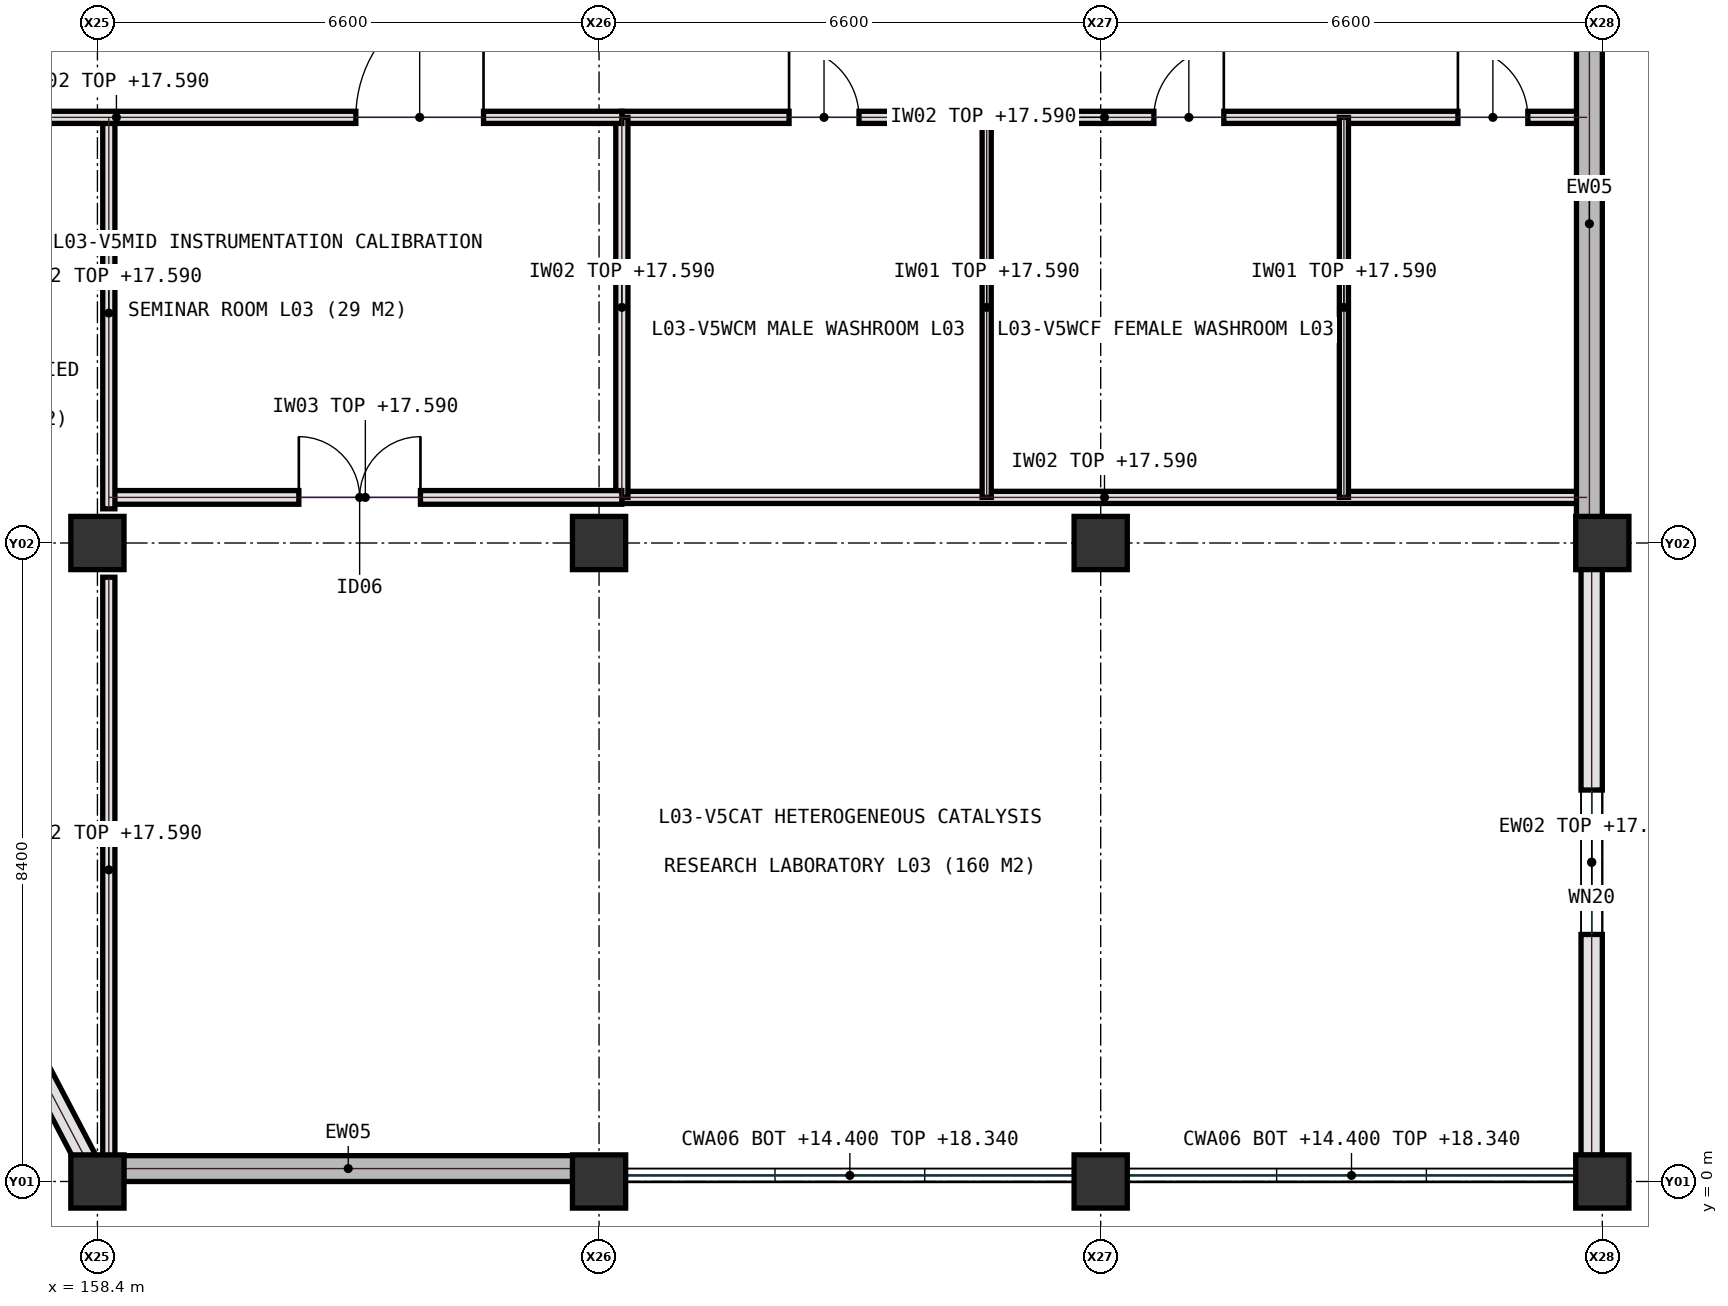
"""IFC4 building model, lengths in metres.
Left out: names, types, materials, properties, quantities, classifications, styles, units other than length and angle.
Written with IfcOpenShell. Run it as: python <this file> out.ifc"""

import sys

from ifc_helpers import new_model, si_unit, direction, frame, frame_2d, origin, origin_2d, place, context, subcontext, project, spatial, rectangle, extrude, element, fill, save


model = new_model("IFC4")
c1 = context("Model", 3, precision=1e-05, world=origin(), true_north=direction((0.0, 1.0)))
c2 = subcontext(c1, "Body", "Model", "MODEL_VIEW")
j1 = project(units=[si_unit("LENGTHUNIT", "METRE"), si_unit("PLANEANGLEUNIT", "RADIAN")], contexts=[c1])
p1 = place(None, origin())
s1 = spatial("IfcSite", under=j1, at=p1, CompositionType="ELEMENT")
p2 = place(p1, origin())
s2 = spatial("IfcBuilding", under=s1, at=p2, CompositionType="ELEMENT")
p3 = place(p2, frame((0.0, 0.0, 14.4)))
s3 = spatial("IfcBuildingStorey", under=s2, at=p3, CompositionType="ELEMENT", Elevation=14.4)
for number, where, z_axis, x_axis in (
    (1, (158.4, 0.0, 0.0), (0.0, 0.0, 1.0), (1.0, 0.0, 0.0)),
    (2, (158.4, 8.4, 0.0), (0.0, 0.0, 1.0), (1.0, 0.0, 0.0)),
    (3, (165.0, 0.0, 0.0), (0.0, 0.0, 1.0), (1.0, 0.0, 0.0)),
    (4, (165.0, 8.4, 0.0), (0.0, 0.0, 1.0), (1.0, 0.0, 0.0)),
    (5, (171.6, 0.0, 0.0), (0.0, 0.0, 1.0), (1.0, 0.0, 0.0)),
    (6, (171.6, 8.4, 0.0), (0.0, 0.0, 1.0), (1.0, 0.0, 0.0)),
    (7, (178.2, 0.0, 0.0), (0.0, 0.0, 1.0), (1.0, 0.0, 0.0)),
    (8, (178.2, 8.4, 0.0), (0.0, 0.0, 1.0), (1.0, 0.0, 0.0)),
):
    element("IfcColumn", number, at=place(p3, frame(where, z_axis=z_axis, x_axis=x_axis)), inside=s3, PredefinedType="COLUMN", context=c2, shape_type="SweptSolid", body=[
        extrude(rectangle(XDim=0.7, YDim=0.7, at=origin_2d()), origin(), (0.0, 0.0, 1.0), 4.2),
    ])
p4 = place(p3, frame((165.3, 14.0, 0.0), z_axis=(0.0, 0.0, 1.0), x_axis=(1.0, 0.0, 0.0)))
e9 = element("IfcWall", 9, at=p4, inside=s3, PredefinedType="PARTITIONING", context=c2, shape_type="SweptSolid", body=[
    extrude(rectangle(XDim=12.7, YDim=0.16, at=frame_2d((6.35, 0.0))), origin(), (0.0, 0.0, 1.0), 3.19),
])
p5 = place(p4, frame((2.2, 0.0, 0.0)))
e10 = element("IfcOpeningElement", 10, at=p5, cuts=e9, PredefinedType="OPENING", context=c2, shape_type="SweptSolid", body=[
    extrude(rectangle(XDim=0.92, YDim=2.08, at=frame_2d((0.46, 1.04))), frame((0.0, 0.09, 0.0), z_axis=(0.0, -1.0, 0.0), x_axis=(1.0, 0.0, 0.0)), (0.0, 0.0, 1.0), 0.18),
])
p6 = place(p4, frame((7.0, 0.0, 0.0)))
e11 = element("IfcOpeningElement", 11, at=p6, cuts=e9, PredefinedType="OPENING", context=c2, shape_type="SweptSolid", body=[
    extrude(rectangle(XDim=0.92, YDim=2.08, at=frame_2d((0.46, 1.04))), frame((0.0, 0.09, 0.0), z_axis=(0.0, -1.0, 0.0), x_axis=(1.0, 0.0, 0.0)), (0.0, 0.0, 1.0), 0.18),
])
p7 = place(p4, frame((11.0, 0.0, 0.0)))
e12 = element("IfcOpeningElement", 12, at=p7, cuts=e9, PredefinedType="OPENING", context=c2, shape_type="SweptSolid", body=[
    extrude(rectangle(XDim=0.92, YDim=2.08, at=frame_2d((0.46, 1.04))), frame((0.0, 0.09, 0.0), z_axis=(0.0, -1.0, 0.0), x_axis=(1.0, 0.0, 0.0)), (0.0, 0.0, 1.0), 0.18),
])
p8 = place(p3, frame((165.3, 9.0, 0.0), z_axis=(0.0, 0.0, 1.0), x_axis=(1.0, 0.0, 0.0)))
e13 = element("IfcWall", 13, at=p8, inside=s3, PredefinedType="PARTITIONING", context=c2, shape_type="SweptSolid", body=[
    extrude(rectangle(XDim=12.7, YDim=0.16, at=frame_2d((6.35, 0.0))), origin(), (0.0, 0.0, 1.0), 3.19),
])
p9 = place(p3, frame((165.3, 9.0, 0.0), z_axis=(0.0, 0.0, 1.0), x_axis=(0.0, 1.0, 0.0)))
e14 = element("IfcWall", 14, at=p9, inside=s3, PredefinedType="PARTITIONING", context=c2, shape_type="SweptSolid", body=[
    extrude(rectangle(XDim=5.0, YDim=0.16, at=frame_2d((2.5, 0.0))), origin(), (0.0, 0.0, 1.0), 3.19),
])
for number, where, z_axis, x_axis in (
    (15, (170.1, 9.0, 0.0), (0.0, 0.0, 1.0), (0.0, 1.0, 0.0)),
    (16, (174.8, 9.0, 0.0), (0.0, 0.0, 1.0), (0.0, 1.0, 0.0)),
):
    element("IfcWall", number, at=place(p3, frame(where, z_axis=z_axis, x_axis=x_axis)), inside=s3, PredefinedType="PARTITIONING", context=c2, shape_type="SweptSolid", body=[
        extrude(rectangle(XDim=5.0, YDim=0.12, at=frame_2d((2.5, 0.0))), origin(), (0.0, 0.0, 1.0), 3.19),
    ])
p10 = place(p3, frame((158.55, 9.0, 0.0), z_axis=(0.0, 0.0, 1.0), x_axis=(1.0, 0.0, 0.0)))
e17 = element("IfcWall", 17, at=p10, inside=s3, PredefinedType="SOLIDWALL", context=c2, shape_type="SweptSolid", body=[
    extrude(rectangle(XDim=6.75, YDim=0.18, at=frame_2d((3.375, 0.0))), origin(), (0.0, 0.0, 1.0), 3.19),
])
p11 = place(p10, frame((2.5, 0.0, 0.0)))
e18 = element("IfcOpeningElement", 18, at=p11, cuts=e17, PredefinedType="OPENING", context=c2, shape_type="SweptSolid", body=[
    extrude(rectangle(XDim=1.6, YDim=2.2, at=frame_2d((0.8, 1.1))), frame((0.0, 0.1, 0.0), z_axis=(0.0, -1.0, 0.0), x_axis=(1.0, 0.0, 0.0)), (0.0, 0.0, 1.0), 0.2),
])
p12 = place(p3, frame((158.55, 0.25, 0.0), z_axis=(0.0, 0.0, 1.0), x_axis=(0.0, 1.0, 0.0)))
e19 = element("IfcWall", 19, at=p12, inside=s3, PredefinedType="PARTITIONING", context=c2, shape_type="SweptSolid", body=[
    extrude(rectangle(XDim=7.7, YDim=0.16, at=frame_2d((3.85, 0.0))), origin(), (0.0, 0.0, 1.0), 3.19),
])
p13 = place(p3, frame((158.55, 8.85, 0.0), z_axis=(0.0, 0.0, 1.0), x_axis=(0.0, 1.0, 0.0)))
e20 = element("IfcWall", 20, at=p13, inside=s3, PredefinedType="PARTITIONING", context=c2, shape_type="SweptSolid", body=[
    extrude(rectangle(XDim=5.15, YDim=0.16, at=frame_2d((2.575, 0.0))), origin(), (0.0, 0.0, 1.0), 3.19),
])
p14 = place(p3, frame((152.0, 14.0, 0.0), z_axis=(0.0, 0.0, 1.0), x_axis=(1.0, 0.0, 0.0)))
e21 = element("IfcWall", 21, at=p14, inside=s3, PredefinedType="PARTITIONING", context=c2, shape_type="SweptSolid", body=[
    extrude(rectangle(XDim=13.3, YDim=0.16, at=frame_2d((6.65, 0.0))), origin(), (0.0, 0.0, 1.0), 3.19),
])
p15 = place(p14, frame((2.6, 0.0, 0.0)))
e22 = element("IfcOpeningElement", 22, at=p15, cuts=e21, PredefinedType="OPENING", context=c2, shape_type="SweptSolid", body=[
    extrude(rectangle(XDim=1.68, YDim=2.28, at=frame_2d((0.84, 1.14))), frame((0.0, 0.09, 0.0), z_axis=(0.0, -1.0, 0.0), x_axis=(1.0, 0.0, 0.0)), (0.0, 0.0, 1.0), 0.18),
])
p16 = place(p14, frame((9.8, 0.0, 0.0)))
e23 = element("IfcOpeningElement", 23, at=p16, cuts=e21, PredefinedType="OPENING", context=c2, shape_type="SweptSolid", body=[
    extrude(rectangle(XDim=1.68, YDim=2.28, at=frame_2d((0.84, 1.14))), frame((0.0, 0.09, 0.0), z_axis=(0.0, -1.0, 0.0), x_axis=(1.0, 0.0, 0.0)), (0.0, 0.0, 1.0), 0.18),
])
p17 = place(p3, frame((158.745, 0.17, 0.0), z_axis=(0.0, 0.0, 1.0), x_axis=(1.0, 0.0, 0.0)))
e24 = element("IfcWall", 24, at=p17, inside=s3, PredefinedType="SHEAR", context=c2, shape_type="SweptSolid", body=[
    extrude(rectangle(XDim=5.91, YDim=0.34, at=frame_2d((2.955, 0.0))), origin(), (0.0, 0.0, 1.0), 3.94),
])
p18 = place(p3, frame((178.06, 0.345, 0.0), z_axis=(0.0, 0.0, 1.0), x_axis=(0.0, 1.0, 0.0)))
e25 = element("IfcWall", 25, at=p18, inside=s3, PredefinedType="SOLIDWALL", context=c2, shape_type="SweptSolid", body=[
    extrude(rectangle(XDim=7.71, YDim=0.28, at=frame_2d((3.855, 0.0))), origin(), (0.0, 0.0, 1.0), 3.225),
])
p19 = place(p18, frame((2.905, 0.0, 0.95)))
e26 = element("IfcOpeningElement", 26, at=p19, cuts=e25, PredefinedType="OPENING", context=c2, shape_type="SweptSolid", body=[
    extrude(rectangle(XDim=1.9, YDim=1.85, at=frame_2d((0.95, 0.925))), frame((0.0, 0.15, 0.0), z_axis=(0.0, -1.0, 0.0), x_axis=(1.0, 0.0, 0.0)), (0.0, 0.0, 1.0), 0.3),
])
p20 = place(p3, frame((178.03, 8.745, 0.0), z_axis=(0.0, 0.0, 1.0), x_axis=(0.0, 1.0, 0.0)))
e27 = element("IfcWall", 27, at=p20, inside=s3, PredefinedType="SHEAR", context=c2, shape_type="SweptSolid", body=[
    extrude(rectangle(XDim=7.71, YDim=0.34, at=frame_2d((3.855, 0.0))), origin(), (0.0, 0.0, 1.0), 3.94),
])
p21 = place(p3, frame((155.25, 6.01, 0.0), z_axis=(0.0, 0.0, 1.0), x_axis=(0.464471613901, -0.885588007981, 0.0)))
e28 = element("IfcWall", 28, at=p21, inside=s3, PredefinedType="SOLIDWALL", context=c2, shape_type="SweptSolid", body=[
    extrude(rectangle(XDim=6.459, YDim=0.28, at=frame_2d((3.229, 0.0))), origin(), (0.0, 0.0, 1.0), 3.325),
])
p22 = place(p21, frame((2.03, 0.0, 0.95)))
e29 = element("IfcOpeningElement", 29, at=p22, cuts=e28, PredefinedType="OPENING", context=c2, shape_type="SweptSolid", body=[
    extrude(rectangle(XDim=2.4, YDim=1.6, at=frame_2d((1.2, 0.8))), frame((0.0, 0.15, 0.0), z_axis=(0.0, -1.0, 0.0), x_axis=(1.0, 0.0, 0.0)), (0.0, 0.0, 1.0), 0.3),
])
p23 = place(p5, origin())
e30 = element("IfcDoor", 30, at=p23, inside=s3, OperationType="SINGLE_SWING_LEFT", PredefinedType="DOOR", context=c2, shape_type="SweptSolid", body=[
    extrude(rectangle(XDim=0.92, YDim=2.08, at=frame_2d((0.46, 1.04))), frame((0.0, 0.025, 0.0), z_axis=(0.0, -1.0, 0.0), x_axis=(1.0, 0.0, 0.0)), (0.0, 0.0, 1.0), 0.05),
])
fill(e10, e30)
p24 = place(p6, origin())
e31 = element("IfcDoor", 31, at=p24, inside=s3, OperationType="SINGLE_SWING_RIGHT", PredefinedType="DOOR", context=c2, shape_type="SweptSolid", body=[
    extrude(rectangle(XDim=0.92, YDim=2.08, at=frame_2d((0.46, 1.04))), frame((0.0, 0.025, 0.0), z_axis=(0.0, -1.0, 0.0), x_axis=(1.0, 0.0, 0.0)), (0.0, 0.0, 1.0), 0.05),
])
fill(e11, e31)
p25 = place(p7, origin())
e32 = element("IfcDoor", 32, at=p25, inside=s3, OperationType="SINGLE_SWING_LEFT", PredefinedType="DOOR", context=c2, shape_type="SweptSolid", body=[
    extrude(rectangle(XDim=0.92, YDim=2.08, at=frame_2d((0.46, 1.04))), frame((0.0, 0.025, 0.0), z_axis=(0.0, -1.0, 0.0), x_axis=(1.0, 0.0, 0.0)), (0.0, 0.0, 1.0), 0.05),
])
fill(e12, e32)
p26 = place(p11, origin())
e33 = element("IfcDoor", 33, at=p26, inside=s3, OperationType="DOUBLE_DOOR_SINGLE_SWING", PredefinedType="DOOR", context=c2, shape_type="SweptSolid", body=[
    extrude(rectangle(XDim=1.6, YDim=2.2, at=frame_2d((0.8, 1.1))), frame((0.0, 0.025, 0.0), z_axis=(0.0, -1.0, 0.0), x_axis=(1.0, 0.0, 0.0)), (0.0, 0.0, 1.0), 0.05),
])
fill(e18, e33)
p27 = place(p16, origin())
e34 = element("IfcDoor", 34, at=p27, inside=s3, OperationType="SINGLE_SWING_RIGHT", PredefinedType="DOOR", context=c2, shape_type="SweptSolid", body=[
    extrude(rectangle(XDim=1.68, YDim=2.28, at=frame_2d((0.84, 1.14))), frame((0.0, 0.025, 0.0), z_axis=(0.0, -1.0, 0.0), x_axis=(1.0, 0.0, 0.0)), (0.0, 0.0, 1.0), 0.05),
])
fill(e23, e34)
p28 = place(p19, origin())
e35 = element("IfcWindow", 35, at=p28, inside=s3, PartitioningType="SINGLE_PANEL", PredefinedType="WINDOW", context=c2, shape_type="SweptSolid", body=[
    extrude(rectangle(XDim=1.9, YDim=1.85, at=frame_2d((0.95, 0.925))), frame((0.0, 0.03, 0.0), z_axis=(0.0, -1.0, 0.0), x_axis=(1.0, 0.0, 0.0)), (0.0, 0.0, 1.0), 0.06),
])
fill(e26, e35)
save(model, sys.argv[1])
